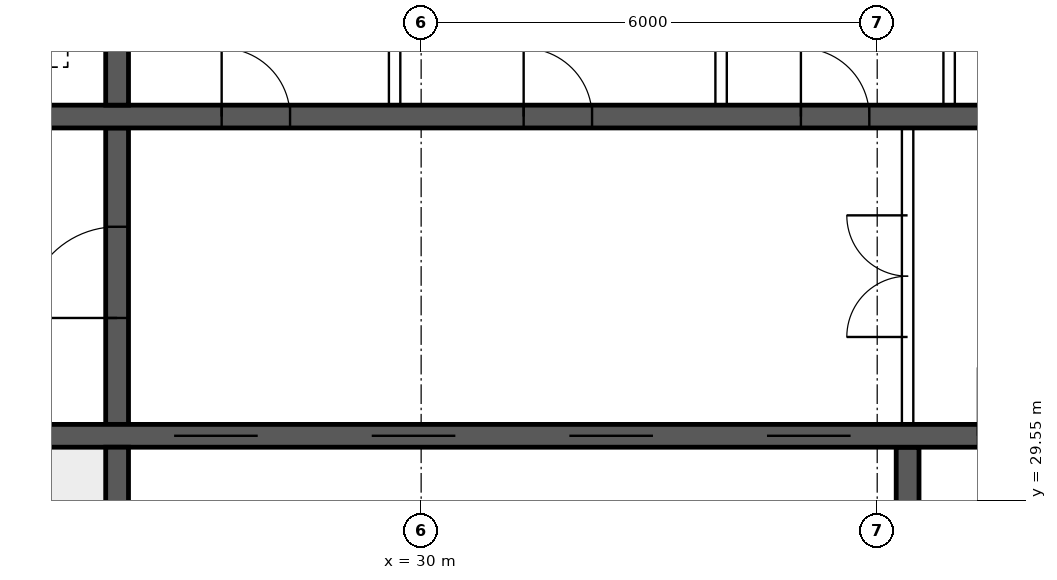
"""IFC4 building model, lengths in metres.
Left out: names, types, materials, properties, quantities, classifications, styles, units other than length and angle.
Written with IfcOpenShell. Run it as: python <this file> out.ifc"""

import sys

from ifc_helpers import new_model, si_unit, direction, frame, frame_2d, origin, place, context, subcontext, project, spatial, rectangle, extrude, element, fill, save


model = new_model("IFC4")
c1 = context("Model", 3, precision=1e-05, world=origin(), true_north=direction((0.0, 1.0)))
c2 = subcontext(c1, "Body", "Model", "MODEL_VIEW")
j1 = project(units=[si_unit("LENGTHUNIT", "METRE"), si_unit("PLANEANGLEUNIT", "RADIAN")], contexts=[c1])
p1 = place(None, origin())
s1 = spatial("IfcSite", under=j1, at=p1, CompositionType="ELEMENT")
p2 = place(p1, origin())
s2 = spatial("IfcBuilding", under=s1, at=p2, CompositionType="ELEMENT")
p3 = place(p2, frame((0.0, 0.0, 95.65)))
s3 = spatial("IfcBuildingStorey", under=s2, at=p3, CompositionType="ELEMENT", Elevation=95.65)
p4 = place(p3, frame((18.475, 30.4, 0.0), z_axis=(0.0, 0.0, 1.0), x_axis=(1.0, 0.0, 0.0)))
e1 = element("IfcWall", 1, at=p4, inside=s3, PredefinedType="SHEAR", context=c2, shape_type="SweptSolid", body=[
    extrude(rectangle(XDim=47.05, YDim=0.3, at=frame_2d((23.525, 0.0))), origin(), (0.0, 0.0, 1.0), 3.75),
])
p5 = place(p4, frame((0.4, 0.0, 0.0)))
e2 = element("IfcOpeningElement", 2, at=p5, cuts=e1, PredefinedType="OPENING", context=c2, shape_type="SweptSolid", body=[
    extrude(rectangle(XDim=1.0, YDim=2.1, at=frame_2d((0.5, 1.05))), frame((0.0, 0.16, 0.0), z_axis=(0.0, -1.0, 0.0), x_axis=(1.0, 0.0, 0.0)), (0.0, 0.0, 1.0), 0.32),
])
p6 = place(p4, frame((45.65, 0.0, 0.0)))
e3 = element("IfcOpeningElement", 3, at=p6, cuts=e1, PredefinedType="OPENING", context=c2, shape_type="SweptSolid", body=[
    extrude(rectangle(XDim=1.0, YDim=2.1, at=frame_2d((0.5, 1.05))), frame((0.0, 0.16, 0.0), z_axis=(0.0, -1.0, 0.0), x_axis=(1.0, 0.0, 0.0)), (0.0, 0.0, 1.0), 0.32),
])
p7 = place(p4, frame((8.275, 0.0, 0.0)))
e4 = element("IfcOpeningElement", 4, at=p7, cuts=e1, PredefinedType="OPENING", context=c2, shape_type="SweptSolid", body=[
    extrude(rectangle(XDim=1.1, YDim=2.1, at=frame_2d((0.55, 1.05))), frame((0.0, 0.16, 0.0), z_axis=(0.0, -1.0, 0.0), x_axis=(1.0, 0.0, 0.0)), (0.0, 0.0, 1.0), 0.32),
])
p8 = place(p4, frame((10.875, 0.0, 0.0)))
e5 = element("IfcOpeningElement", 5, at=p8, cuts=e1, PredefinedType="OPENING", context=c2, shape_type="SweptSolid", body=[
    extrude(rectangle(XDim=1.1, YDim=2.1, at=frame_2d((0.55, 1.05))), frame((0.0, 0.16, 0.0), z_axis=(0.0, -1.0, 0.0), x_axis=(1.0, 0.0, 0.0)), (0.0, 0.0, 1.0), 0.32),
])
p9 = place(p4, frame((13.475, 0.0, 0.0)))
e6 = element("IfcOpeningElement", 6, at=p9, cuts=e1, PredefinedType="OPENING", context=c2, shape_type="SweptSolid", body=[
    extrude(rectangle(XDim=1.1, YDim=2.1, at=frame_2d((0.55, 1.05))), frame((0.0, 0.16, 0.0), z_axis=(0.0, -1.0, 0.0), x_axis=(1.0, 0.0, 0.0)), (0.0, 0.0, 1.0), 0.32),
])
p10 = place(p4, frame((16.075, 0.0, 0.0)))
e7 = element("IfcOpeningElement", 7, at=p10, cuts=e1, PredefinedType="OPENING", context=c2, shape_type="SweptSolid", body=[
    extrude(rectangle(XDim=1.1, YDim=2.1, at=frame_2d((0.55, 1.05))), frame((0.0, 0.16, 0.0), z_axis=(0.0, -1.0, 0.0), x_axis=(1.0, 0.0, 0.0)), (0.0, 0.0, 1.0), 0.32),
])
p11 = place(p4, frame((18.85, 0.0, 0.0)))
e8 = element("IfcOpeningElement", 8, at=p11, cuts=e1, PredefinedType="OPENING", context=c2, shape_type="SweptSolid", body=[
    extrude(rectangle(XDim=0.9, YDim=2.1, at=frame_2d((0.45, 1.05))), frame((0.0, 0.16, 0.0), z_axis=(0.0, -1.0, 0.0), x_axis=(1.0, 0.0, 0.0)), (0.0, 0.0, 1.0), 0.32),
])
p12 = place(p4, frame((30.142, 0.0, 0.0)))
e9 = element("IfcOpeningElement", 9, at=p12, cuts=e1, PredefinedType="OPENING", context=c2, shape_type="SweptSolid", body=[
    extrude(rectangle(XDim=1.1, YDim=2.1, at=frame_2d((0.55, 1.05))), frame((0.0, 0.16, 0.0), z_axis=(0.0, -1.0, 0.0), x_axis=(1.0, 0.0, 0.0)), (0.0, 0.0, 1.0), 0.32),
])
p13 = place(p4, frame((33.675, 0.0, 0.0)))
e10 = element("IfcOpeningElement", 10, at=p13, cuts=e1, PredefinedType="OPENING", context=c2, shape_type="SweptSolid", body=[
    extrude(rectangle(XDim=1.1, YDim=2.1, at=frame_2d((0.55, 1.05))), frame((0.0, 0.16, 0.0), z_axis=(0.0, -1.0, 0.0), x_axis=(1.0, 0.0, 0.0)), (0.0, 0.0, 1.0), 0.32),
])
p14 = place(p4, frame((37.208, 0.0, 0.0)))
e11 = element("IfcOpeningElement", 11, at=p14, cuts=e1, PredefinedType="OPENING", context=c2, shape_type="SweptSolid", body=[
    extrude(rectangle(XDim=1.1, YDim=2.1, at=frame_2d((0.55, 1.05))), frame((0.0, 0.16, 0.0), z_axis=(0.0, -1.0, 0.0), x_axis=(1.0, 0.0, 0.0)), (0.0, 0.0, 1.0), 0.32),
])
p15 = place(p3, frame((18.475, 34.6, 0.0), z_axis=(0.0, 0.0, 1.0), x_axis=(1.0, 0.0, 0.0)))
e12 = element("IfcWall", 12, at=p15, inside=s3, PredefinedType="SHEAR", context=c2, shape_type="SweptSolid", body=[
    extrude(rectangle(XDim=47.05, YDim=0.3, at=frame_2d((23.525, 0.0))), origin(), (0.0, 0.0, 1.0), 3.75),
])
p16 = place(p15, frame((0.9, 0.0, 0.0)))
e13 = element("IfcOpeningElement", 13, at=p16, cuts=e12, PredefinedType="OPENING", context=c2, shape_type="SweptSolid", body=[
    extrude(rectangle(XDim=1.1, YDim=2.1, at=frame_2d((0.55, 1.05))), frame((0.0, 0.16, 0.0), z_axis=(0.0, -1.0, 0.0), x_axis=(1.0, 0.0, 0.0)), (0.0, 0.0, 1.0), 0.32),
])
p17 = place(p15, frame((45.05, 0.0, 0.0)))
e14 = element("IfcOpeningElement", 14, at=p17, cuts=e12, PredefinedType="OPENING", context=c2, shape_type="SweptSolid", body=[
    extrude(rectangle(XDim=1.1, YDim=2.1, at=frame_2d((0.55, 1.05))), frame((0.0, 0.16, 0.0), z_axis=(0.0, -1.0, 0.0), x_axis=(1.0, 0.0, 0.0)), (0.0, 0.0, 1.0), 0.32),
])
p18 = place(p15, frame((4.125, 0.0, 0.0)))
e15 = element("IfcOpeningElement", 15, at=p18, cuts=e12, PredefinedType="OPENING", context=c2, shape_type="SweptSolid", body=[
    extrude(rectangle(XDim=0.9, YDim=2.1, at=frame_2d((0.45, 1.05))), frame((0.0, 0.16, 0.0), z_axis=(0.0, -1.0, 0.0), x_axis=(1.0, 0.0, 0.0)), (0.0, 0.0, 1.0), 0.32),
])
p19 = place(p15, frame((42.025, 0.0, 0.0)))
e16 = element("IfcOpeningElement", 16, at=p19, cuts=e12, PredefinedType="OPENING", context=c2, shape_type="SweptSolid", body=[
    extrude(rectangle(XDim=0.9, YDim=2.1, at=frame_2d((0.45, 1.05))), frame((0.0, 0.16, 0.0), z_axis=(0.0, -1.0, 0.0), x_axis=(1.0, 0.0, 0.0)), (0.0, 0.0, 1.0), 0.32),
])
p20 = place(p15, frame((8.9, 0.0, 0.0)))
e17 = element("IfcOpeningElement", 17, at=p20, cuts=e12, PredefinedType="OPENING", context=c2, shape_type="SweptSolid", body=[
    extrude(rectangle(XDim=0.9, YDim=2.1, at=frame_2d((0.45, 1.05))), frame((0.0, 0.16, 0.0), z_axis=(0.0, -1.0, 0.0), x_axis=(1.0, 0.0, 0.0)), (0.0, 0.0, 1.0), 0.32),
])
p21 = place(p15, frame((12.874, 0.0, 0.0)))
e18 = element("IfcOpeningElement", 18, at=p21, cuts=e12, PredefinedType="OPENING", context=c2, shape_type="SweptSolid", body=[
    extrude(rectangle(XDim=0.9, YDim=2.1, at=frame_2d((0.45, 1.05))), frame((0.0, 0.16, 0.0), z_axis=(0.0, -1.0, 0.0), x_axis=(1.0, 0.0, 0.0)), (0.0, 0.0, 1.0), 0.32),
])
p22 = place(p15, frame((16.521, 0.0, 0.0)))
e19 = element("IfcOpeningElement", 19, at=p22, cuts=e12, PredefinedType="OPENING", context=c2, shape_type="SweptSolid", body=[
    extrude(rectangle(XDim=0.9, YDim=2.1, at=frame_2d((0.45, 1.05))), frame((0.0, 0.16, 0.0), z_axis=(0.0, -1.0, 0.0), x_axis=(1.0, 0.0, 0.0)), (0.0, 0.0, 1.0), 0.32),
])
p23 = place(p15, frame((20.28, 0.0, 0.0)))
e20 = element("IfcOpeningElement", 20, at=p23, cuts=e12, PredefinedType="OPENING", context=c2, shape_type="SweptSolid", body=[
    extrude(rectangle(XDim=0.9, YDim=2.1, at=frame_2d((0.45, 1.05))), frame((0.0, 0.16, 0.0), z_axis=(0.0, -1.0, 0.0), x_axis=(1.0, 0.0, 0.0)), (0.0, 0.0, 1.0), 0.32),
])
p24 = place(p15, frame((24.686, 0.0, 0.0)))
e21 = element("IfcOpeningElement", 21, at=p24, cuts=e12, PredefinedType="OPENING", context=c2, shape_type="SweptSolid", body=[
    extrude(rectangle(XDim=0.9, YDim=2.1, at=frame_2d((0.45, 1.05))), frame((0.0, 0.16, 0.0), z_axis=(0.0, -1.0, 0.0), x_axis=(1.0, 0.0, 0.0)), (0.0, 0.0, 1.0), 0.32),
])
p25 = place(p15, frame((27.483, 0.0, 0.0)))
e22 = element("IfcOpeningElement", 22, at=p25, cuts=e12, PredefinedType="OPENING", context=c2, shape_type="SweptSolid", body=[
    extrude(rectangle(XDim=0.9, YDim=2.1, at=frame_2d((0.45, 1.05))), frame((0.0, 0.16, 0.0), z_axis=(0.0, -1.0, 0.0), x_axis=(1.0, 0.0, 0.0)), (0.0, 0.0, 1.0), 0.32),
])
p26 = place(p15, frame((30.666, 0.0, 0.0)))
e23 = element("IfcOpeningElement", 23, at=p26, cuts=e12, PredefinedType="OPENING", context=c2, shape_type="SweptSolid", body=[
    extrude(rectangle(XDim=0.9, YDim=2.1, at=frame_2d((0.45, 1.05))), frame((0.0, 0.16, 0.0), z_axis=(0.0, -1.0, 0.0), x_axis=(1.0, 0.0, 0.0)), (0.0, 0.0, 1.0), 0.32),
])
p27 = place(p15, frame((34.617, 0.0, 0.0)))
e24 = element("IfcOpeningElement", 24, at=p27, cuts=e12, PredefinedType="OPENING", context=c2, shape_type="SweptSolid", body=[
    extrude(rectangle(XDim=0.9, YDim=2.1, at=frame_2d((0.45, 1.05))), frame((0.0, 0.16, 0.0), z_axis=(0.0, -1.0, 0.0), x_axis=(1.0, 0.0, 0.0)), (0.0, 0.0, 1.0), 0.32),
])
p28 = place(p15, frame((37.555, 0.0, 0.0)))
e25 = element("IfcOpeningElement", 25, at=p28, cuts=e12, PredefinedType="OPENING", context=c2, shape_type="SweptSolid", body=[
    extrude(rectangle(XDim=0.9, YDim=2.1, at=frame_2d((0.45, 1.05))), frame((0.0, 0.16, 0.0), z_axis=(0.0, -1.0, 0.0), x_axis=(1.0, 0.0, 0.0)), (0.0, 0.0, 1.0), 0.32),
])
p29 = place(p3, frame((26.0, 26.275, 0.0), z_axis=(0.0, 0.0, 1.0), x_axis=(0.0, 1.0, 0.0)))
e26 = element("IfcWall", 26, at=p29, inside=s3, PredefinedType="SHEAR", context=c2, shape_type="SweptSolid", body=[
    extrude(rectangle(XDim=3.975, YDim=0.3, at=frame_2d((1.988, 0.0))), origin(), (0.0, 0.0, 1.0), 3.75),
])
p30 = place(p3, frame((26.0, 30.55, 0.0), z_axis=(0.0, 0.0, 1.0), x_axis=(0.0, 1.0, 0.0)))
e27 = element("IfcWall", 27, at=p30, inside=s3, PredefinedType="SHEAR", context=c2, shape_type="SweptSolid", body=[
    extrude(rectangle(XDim=3.9, YDim=0.3, at=frame_2d((1.95, 0.0))), origin(), (0.0, 0.0, 1.0), 3.75),
])
p31 = place(p30, frame((1.4, 0.0, 0.0)))
e28 = element("IfcOpeningElement", 28, at=p31, cuts=e27, PredefinedType="OPENING", context=c2, shape_type="SweptSolid", body=[
    extrude(rectangle(XDim=1.2, YDim=2.1, at=frame_2d((0.6, 1.05))), frame((0.0, 0.16, 0.0), z_axis=(0.0, -1.0, 0.0), x_axis=(1.0, 0.0, 0.0)), (0.0, 0.0, 1.0), 0.32),
])
p32 = place(p3, frame((26.0, 34.75, 0.0), z_axis=(0.0, 0.0, 1.0), x_axis=(0.0, 1.0, 0.0)))
e29 = element("IfcWall", 29, at=p32, inside=s3, PredefinedType="SHEAR", context=c2, shape_type="SweptSolid", body=[
    extrude(rectangle(XDim=2.975, YDim=0.3, at=frame_2d((1.488, 0.0))), origin(), (0.0, 0.0, 1.0), 3.75),
])
p33 = place(p3, frame((36.4, 26.275, 0.0), z_axis=(0.0, 0.0, 1.0), x_axis=(0.0, 1.0, 0.0)))
e30 = element("IfcWall", 30, at=p33, inside=s3, PredefinedType="SHEAR", context=c2, shape_type="SweptSolid", body=[
    extrude(rectangle(XDim=3.975, YDim=0.3, at=frame_2d((1.988, 0.0))), origin(), (0.0, 0.0, 1.0), 3.75),
])
p34 = place(p3, frame((36.4, 30.55, 0.0), z_axis=(0.0, 0.0, 1.0), x_axis=(0.0, 1.0, 0.0)))
e31 = element("IfcWall", 31, at=p34, inside=s3, PredefinedType="SOLIDWALL", context=c2, shape_type="SweptSolid", body=[
    extrude(rectangle(XDim=3.9, YDim=0.15, at=frame_2d((1.95, 0.0))), origin(), (0.0, 0.0, 1.0), 3.3),
])
p35 = place(p34, frame((1.15, 0.0, 0.0)))
e32 = element("IfcOpeningElement", 32, at=p35, cuts=e31, PredefinedType="OPENING", context=c2, shape_type="SweptSolid", body=[
    extrude(rectangle(XDim=1.6, YDim=2.1, at=frame_2d((0.8, 1.05))), frame((0.0, 0.085, 0.0), z_axis=(0.0, -1.0, 0.0), x_axis=(1.0, 0.0, 0.0)), (0.0, 0.0, 1.0), 0.17),
])
for number, where, z_axis, x_axis in (
    (33, (29.651, 34.75, 0.0), (0.0, 0.0, 1.0), (0.0, 1.0, 0.0)),
    (34, (33.946, 34.75, 0.0), (0.0, 0.0, 1.0), (0.0, 1.0, 0.0)),
    (35, (36.946, 34.75, 0.0), (0.0, 0.0, 1.0), (0.0, 1.0, 0.0)),
):
    element("IfcWall", number, at=place(p3, frame(where, z_axis=z_axis, x_axis=x_axis)), inside=s3, PredefinedType="SOLIDWALL", context=c2, shape_type="SweptSolid", body=[
        extrude(rectangle(XDim=2.975, YDim=0.15, at=frame_2d((1.488, 0.0))), origin(), (0.0, 0.0, 1.0), 3.3),
    ])
p36 = place(p35, origin())
e36 = element("IfcDoor", 36, at=p36, inside=s3, OperationType="DOUBLE_DOOR_SINGLE_SWING", PredefinedType="DOOR", context=c2, shape_type="SweptSolid", body=[
    extrude(rectangle(XDim=1.6, YDim=2.1, at=frame_2d((0.8, 1.05))), frame((0.0, 0.025, 0.0), z_axis=(0.0, -1.0, 0.0), x_axis=(1.0, 0.0, 0.0)), (0.0, 0.0, 1.0), 0.05),
])
fill(e32, e36)
p37 = place(p31, origin())
e37 = element("IfcDoor", 37, at=p37, inside=s3, OperationType="SINGLE_SWING_LEFT", PredefinedType="DOOR", context=c2, shape_type="SweptSolid", body=[
    extrude(rectangle(XDim=1.2, YDim=2.1, at=frame_2d((0.6, 1.05))), frame((0.0, 0.025, 0.0), z_axis=(0.0, -1.0, 0.0), x_axis=(1.0, 0.0, 0.0)), (0.0, 0.0, 1.0), 0.05),
])
fill(e28, e37)
p38 = place(p20, origin())
e38 = element("IfcDoor", 38, at=p38, inside=s3, OperationType="SINGLE_SWING_LEFT", PredefinedType="DOOR", context=c2, shape_type="SweptSolid", body=[
    extrude(rectangle(XDim=0.9, YDim=2.1, at=frame_2d((0.45, 1.05))), frame((0.0, 0.025, 0.0), z_axis=(0.0, -1.0, 0.0), x_axis=(1.0, 0.0, 0.0)), (0.0, 0.0, 1.0), 0.05),
])
fill(e17, e38)
p39 = place(p21, origin())
e39 = element("IfcDoor", 39, at=p39, inside=s3, OperationType="SINGLE_SWING_LEFT", PredefinedType="DOOR", context=c2, shape_type="SweptSolid", body=[
    extrude(rectangle(XDim=0.9, YDim=2.1, at=frame_2d((0.45, 1.05))), frame((0.0, 0.025, 0.0), z_axis=(0.0, -1.0, 0.0), x_axis=(1.0, 0.0, 0.0)), (0.0, 0.0, 1.0), 0.05),
])
fill(e18, e39)
p40 = place(p22, origin())
e40 = element("IfcDoor", 40, at=p40, inside=s3, OperationType="SINGLE_SWING_LEFT", PredefinedType="DOOR", context=c2, shape_type="SweptSolid", body=[
    extrude(rectangle(XDim=0.9, YDim=2.1, at=frame_2d((0.45, 1.05))), frame((0.0, 0.025, 0.0), z_axis=(0.0, -1.0, 0.0), x_axis=(1.0, 0.0, 0.0)), (0.0, 0.0, 1.0), 0.05),
])
fill(e19, e40)
p41 = place(p7, origin())
e41 = element("IfcDoor", 41, at=p41, inside=s3, OperationType="DOUBLE_DOOR_SLIDING", PredefinedType="DOOR", context=c2, shape_type="SweptSolid", body=[
    extrude(rectangle(XDim=1.1, YDim=2.1, at=frame_2d((0.55, 1.05))), frame((0.0, 0.025, 0.0), z_axis=(0.0, -1.0, 0.0), x_axis=(1.0, 0.0, 0.0)), (0.0, 0.0, 1.0), 0.05),
])
fill(e4, e41)
p42 = place(p8, origin())
e42 = element("IfcDoor", 42, at=p42, inside=s3, OperationType="DOUBLE_DOOR_SLIDING", PredefinedType="DOOR", context=c2, shape_type="SweptSolid", body=[
    extrude(rectangle(XDim=1.1, YDim=2.1, at=frame_2d((0.55, 1.05))), frame((0.0, 0.025, 0.0), z_axis=(0.0, -1.0, 0.0), x_axis=(1.0, 0.0, 0.0)), (0.0, 0.0, 1.0), 0.05),
])
fill(e5, e42)
p43 = place(p9, origin())
e43 = element("IfcDoor", 43, at=p43, inside=s3, OperationType="DOUBLE_DOOR_SLIDING", PredefinedType="DOOR", context=c2, shape_type="SweptSolid", body=[
    extrude(rectangle(XDim=1.1, YDim=2.1, at=frame_2d((0.55, 1.05))), frame((0.0, 0.025, 0.0), z_axis=(0.0, -1.0, 0.0), x_axis=(1.0, 0.0, 0.0)), (0.0, 0.0, 1.0), 0.05),
])
fill(e6, e43)
p44 = place(p10, origin())
e44 = element("IfcDoor", 44, at=p44, inside=s3, OperationType="DOUBLE_DOOR_SLIDING", PredefinedType="DOOR", context=c2, shape_type="SweptSolid", body=[
    extrude(rectangle(XDim=1.1, YDim=2.1, at=frame_2d((0.55, 1.05))), frame((0.0, 0.025, 0.0), z_axis=(0.0, -1.0, 0.0), x_axis=(1.0, 0.0, 0.0)), (0.0, 0.0, 1.0), 0.05),
])
fill(e7, e44)
save(model, sys.argv[1])
